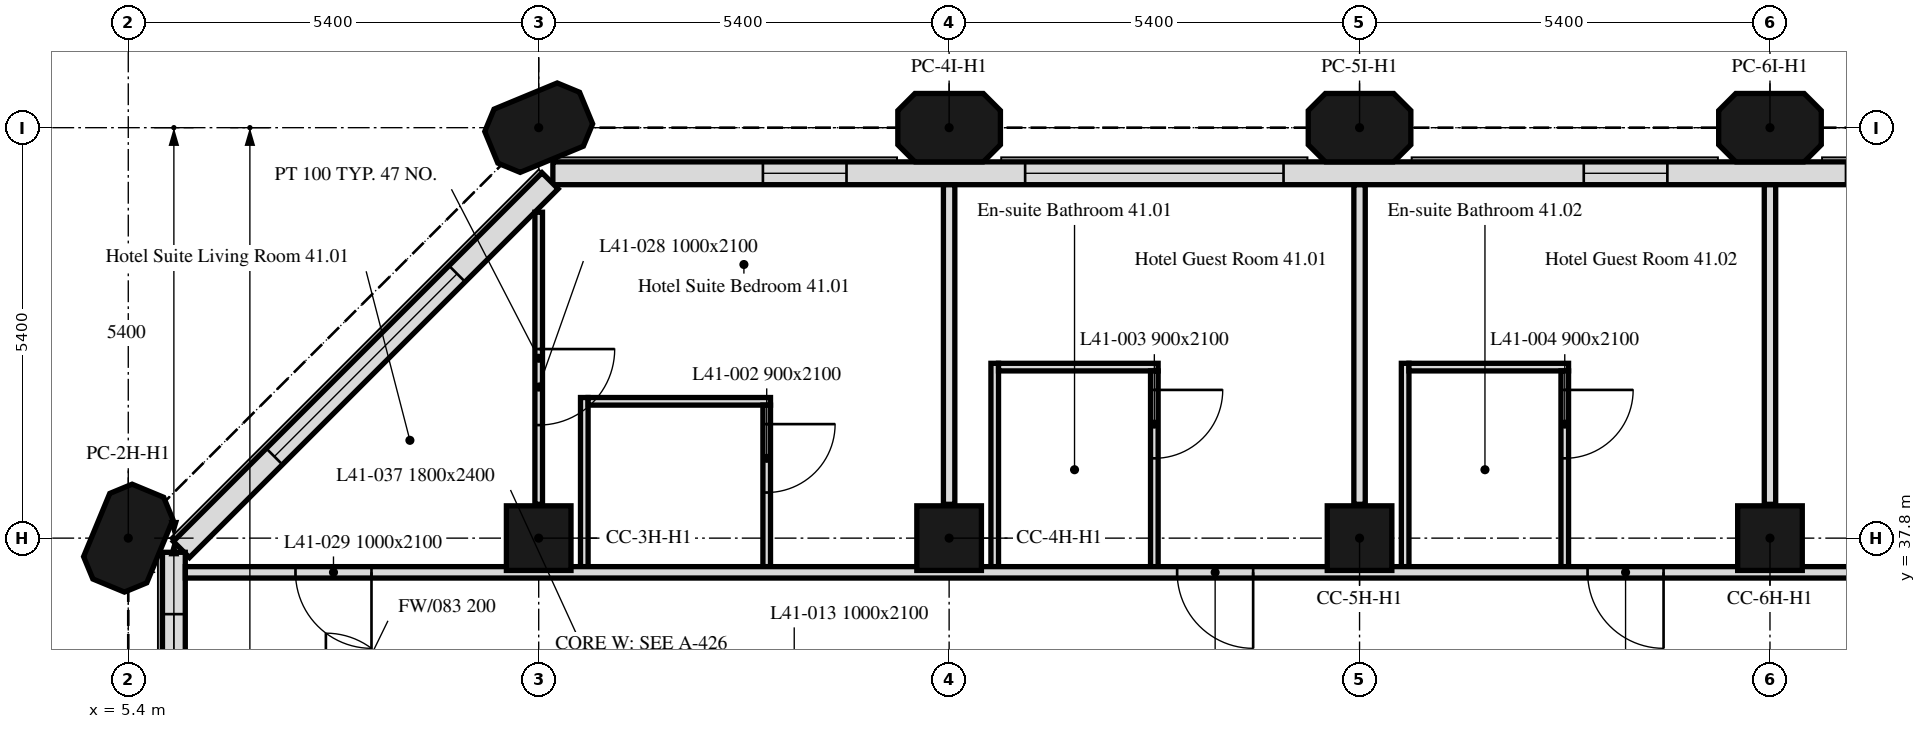
"""IFC4 building model, lengths in metres.
Left out: names, types, materials, properties, quantities, classifications, styles, units other than length and angle.
Written with IfcOpenShell. Run it as: python <this file> out.ifc"""

import sys

from ifc_helpers import new_model, si_unit, direction, frame, frame_2d, origin, origin_2d, place, context, subcontext, project, spatial, polyline, rectangle, outline, extrude, element, fill, save


model = new_model("IFC4")
c1 = context("Model", 3, precision=1e-05, world=origin(), true_north=direction((0.0, 1.0)))
c2 = subcontext(c1, "Body", "Model", "MODEL_VIEW")
j1 = project(units=[si_unit("LENGTHUNIT", "METRE"), si_unit("PLANEANGLEUNIT", "RADIAN")], contexts=[c1])
p1 = place(None, origin())
s1 = spatial("IfcSite", under=j1, at=p1, CompositionType="ELEMENT")
p2 = place(p1, origin())
s2 = spatial("IfcBuilding", under=s1, at=p2, CompositionType="ELEMENT")
p3 = place(p2, frame((0.0, 0.0, 172.6)))
s3 = spatial("IfcBuildingStorey", under=s2, at=p3, CompositionType="ELEMENT", Elevation=172.6)
p4 = place(p3, frame((5.4, 37.8, 0.0), z_axis=(0.0, 0.0, 1.0), x_axis=(0.382683432365, 0.923879532511, 0.0)))
e1 = element("IfcColumn", 1, at=p4, inside=s3, PredefinedType="COLUMN", context=c2, shape_type="SweptSolid", body=[
    extrude(outline(polyline([(-0.45, -0.45), (0.45, -0.45), (0.675, -0.225), (0.675, 0.225), (0.45, 0.45), (-0.45, 0.45), (-0.675, 0.225), (-0.675, -0.225), (-0.45, -0.45)])), origin(), (0.0, 0.0, 1.0), 2.8),
])
for number, where, z_axis, x_axis in (
    (2, (10.8, 37.8, 0.0), (0.0, 0.0, 1.0), (1.0, 0.0, 0.0)),
    (3, (16.2, 37.8, 0.0), (0.0, 0.0, 1.0), (1.0, 0.0, 0.0)),
    (4, (21.6, 37.8, 0.0), (0.0, 0.0, 1.0), (1.0, 0.0, 0.0)),
    (5, (27.0, 37.8, 0.0), (0.0, 0.0, 1.0), (1.0, 0.0, 0.0)),
):
    element("IfcColumn", number, at=place(p3, frame(where, z_axis=z_axis, x_axis=x_axis)), inside=s3, PredefinedType="COLUMN", context=c2, shape_type="SweptSolid", body=[
        extrude(rectangle(XDim=0.85, YDim=0.85, at=origin_2d()), origin(), (0.0, 0.0, 1.0), 2.8),
    ])
for number, where, z_axis, x_axis in (
    (6, (10.8, 43.2, 0.0), (0.0, 0.0, 1.0), (0.924, 0.383, 0.0)),
    (7, (16.2, 43.2, 0.0), (0.0, 0.0, 1.0), (1.0, 0.0, 0.0)),
    (8, (21.6, 43.2, 0.0), (0.0, 0.0, 1.0), (1.0, 0.0, 0.0)),
    (9, (27.0, 43.2, 0.0), (0.0, 0.0, 1.0), (1.0, 0.0, 0.0)),
):
    element("IfcColumn", number, at=place(p3, frame(where, z_axis=z_axis, x_axis=x_axis)), inside=s3, PredefinedType="COLUMN", context=c2, shape_type="SweptSolid", body=[
        extrude(outline(polyline([(-0.45, -0.45), (0.45, -0.45), (0.675, -0.225), (0.675, 0.225), (0.45, 0.45), (-0.45, 0.45), (-0.675, 0.225), (-0.675, -0.225), (-0.45, -0.45)])), origin(), (0.0, 0.0, 1.0), 2.8),
    ])
p5 = place(p3, frame((43.014, 42.6, 0.0), z_axis=(0.0, 0.0, 1.0), x_axis=(-1.0, 0.0, 0.0)))
e10 = element("IfcWall", 10, at=p5, inside=s3, PredefinedType="SOLIDWALL", context=c2, shape_type="SweptSolid", body=[
    extrude(rectangle(XDim=32.027, YDim=0.3, at=frame_2d((16.014, 0.0))), origin(), (0.0, 0.0, 1.0), 2.8),
])
p6 = place(p5, frame((0.814, 0.0, 0.9)))
e11 = element("IfcOpeningElement", 11, at=p6, cuts=e10, PredefinedType="OPENING", context=c2, shape_type="SweptSolid", body=[
    extrude(rectangle(XDim=3.4, YDim=1.7, at=frame_2d((1.7, 0.85))), frame((0.0, 0.16, 0.0), z_axis=(0.0, -1.0, 0.0), x_axis=(1.0, 0.0, 0.0)), (0.0, 0.0, 1.0), 0.32),
])
p7 = place(p5, frame((6.564, 0.0, 0.9)))
e12 = element("IfcOpeningElement", 12, at=p7, cuts=e10, PredefinedType="OPENING", context=c2, shape_type="SweptSolid", body=[
    extrude(rectangle(XDim=1.1, YDim=1.7, at=frame_2d((0.55, 0.85))), frame((0.0, 0.16, 0.0), z_axis=(0.0, -1.0, 0.0), x_axis=(1.0, 0.0, 0.0)), (0.0, 0.0, 1.0), 0.32),
])
p8 = place(p5, frame((11.614, 0.0, 0.9)))
e13 = element("IfcOpeningElement", 13, at=p8, cuts=e10, PredefinedType="OPENING", context=c2, shape_type="SweptSolid", body=[
    extrude(rectangle(XDim=3.4, YDim=1.7, at=frame_2d((1.7, 0.85))), frame((0.0, 0.16, 0.0), z_axis=(0.0, -1.0, 0.0), x_axis=(1.0, 0.0, 0.0)), (0.0, 0.0, 1.0), 0.32),
])
p9 = place(p5, frame((17.364, 0.0, 0.9)))
e14 = element("IfcOpeningElement", 14, at=p9, cuts=e10, PredefinedType="OPENING", context=c2, shape_type="SweptSolid", body=[
    extrude(rectangle(XDim=1.1, YDim=1.7, at=frame_2d((0.55, 0.85))), frame((0.0, 0.16, 0.0), z_axis=(0.0, -1.0, 0.0), x_axis=(1.0, 0.0, 0.0)), (0.0, 0.0, 1.0), 0.32),
])
p10 = place(p5, frame((22.414, 0.0, 0.9)))
e15 = element("IfcOpeningElement", 15, at=p10, cuts=e10, PredefinedType="OPENING", context=c2, shape_type="SweptSolid", body=[
    extrude(rectangle(XDim=3.4, YDim=1.7, at=frame_2d((1.7, 0.85))), frame((0.0, 0.16, 0.0), z_axis=(0.0, -1.0, 0.0), x_axis=(1.0, 0.0, 0.0)), (0.0, 0.0, 1.0), 0.32),
])
p11 = place(p5, frame((28.164, 0.0, 0.9)))
e16 = element("IfcOpeningElement", 16, at=p11, cuts=e10, PredefinedType="OPENING", context=c2, shape_type="SweptSolid", body=[
    extrude(rectangle(XDim=1.1, YDim=1.7, at=frame_2d((0.55, 0.85))), frame((0.0, 0.16, 0.0), z_axis=(0.0, -1.0, 0.0), x_axis=(1.0, 0.0, 0.0)), (0.0, 0.0, 1.0), 0.32),
])
p12 = place(p3, frame((10.949, 42.501, 0.0), z_axis=(0.0, 0.0, 1.0), x_axis=(-0.707106781187, -0.707106781187, 0.0)))
e17 = element("IfcWall", 17, at=p12, inside=s3, PredefinedType="SOLIDWALL", context=c2, shape_type="SweptSolid", body=[
    extrude(rectangle(XDim=6.86, YDim=0.3, at=frame_2d((3.43, 0.0))), origin(), (0.0, 0.0, 1.0), 2.8),
])
p13 = place(p12, frame((1.73, 0.0, 0.9)))
e18 = element("IfcOpeningElement", 18, at=p13, cuts=e17, PredefinedType="OPENING", context=c2, shape_type="SweptSolid", body=[
    extrude(rectangle(XDim=3.4, YDim=1.7, at=frame_2d((1.7, 0.85))), frame((0.0, 0.16, 0.0), z_axis=(0.0, -1.0, 0.0), x_axis=(1.0, 0.0, 0.0)), (0.0, 0.0, 1.0), 0.32),
])
p14 = place(p3, frame((6.0, 37.614, 0.0), z_axis=(0.0, 0.0, 1.0), x_axis=(0.0, -1.0, 0.0)))
e19 = element("IfcWall", 19, at=p14, inside=s3, PredefinedType="SOLIDWALL", context=c2, shape_type="SweptSolid", body=[
    extrude(rectangle(XDim=5.214, YDim=0.3, at=frame_2d((2.607, 0.0))), origin(), (0.0, 0.0, 1.0), 2.8),
])
p15 = place(p14, frame((0.814, 0.0, 0.9)))
e20 = element("IfcOpeningElement", 20, at=p15, cuts=e19, PredefinedType="OPENING", context=c2, shape_type="SweptSolid", body=[
    extrude(rectangle(XDim=1.1, YDim=1.7, at=frame_2d((0.55, 0.85))), frame((0.0, 0.16, 0.0), z_axis=(0.0, -1.0, 0.0), x_axis=(1.0, 0.0, 0.0)), (0.0, 0.0, 1.0), 0.32),
])
p16 = place(p14, frame((2.764, 0.0, 0.9)))
e21 = element("IfcOpeningElement", 21, at=p16, cuts=e19, PredefinedType="OPENING", context=c2, shape_type="SweptSolid", body=[
    extrude(rectangle(XDim=1.1, YDim=1.7, at=frame_2d((0.55, 0.85))), frame((0.0, 0.16, 0.0), z_axis=(0.0, -1.0, 0.0), x_axis=(1.0, 0.0, 0.0)), (0.0, 0.0, 1.0), 0.32),
])
p17 = place(p3, frame((10.8, 42.088, 0.0), z_axis=(0.0, 0.0, 1.0), x_axis=(0.0, -1.0, 0.0)))
e22 = element("IfcWall", 22, at=p17, inside=s3, PredefinedType="PARTITIONING", context=c2, shape_type="SweptSolid", body=[
    extrude(rectangle(XDim=3.843, YDim=0.1, at=frame_2d((1.921, 0.0))), origin(), (0.0, 0.0, 1.0), 2.8),
])
p18 = place(p17, frame((1.8, 0.0, 0.0)))
e23 = element("IfcOpeningElement", 23, at=p18, cuts=e22, PredefinedType="OPENING", context=c2, shape_type="SweptSolid", body=[
    extrude(rectangle(XDim=1.0, YDim=2.1, at=frame_2d((0.5, 1.05))), frame((0.0, 0.05, 0.0), z_axis=(0.0, -1.0, 0.0), x_axis=(1.0, 0.0, 0.0)), (0.0, 0.0, 1.0), 0.1),
])
p19 = place(p3, frame((11.4, 37.425, 0.0), z_axis=(0.0, 0.0, 1.0), x_axis=(0.0, 1.0, 0.0)))
e24 = element("IfcWall", 24, at=p19, inside=s3, PredefinedType="PARTITIONING", context=c2, shape_type="SweptSolid", body=[
    extrude(rectangle(XDim=2.225, YDim=0.1, at=frame_2d((1.112, 0.0))), origin(), (0.0, 0.0, 1.0), 2.8),
])
p20 = place(p3, frame((11.45, 39.6, 0.0), z_axis=(0.0, 0.0, 1.0), x_axis=(1.0, 0.0, 0.0)))
e25 = element("IfcWall", 25, at=p20, inside=s3, PredefinedType="PARTITIONING", context=c2, shape_type="SweptSolid", body=[
    extrude(rectangle(XDim=2.4, YDim=0.1, at=frame_2d((1.2, 0.0))), origin(), (0.0, 0.0, 1.0), 2.8),
])
p21 = place(p3, frame((13.8, 39.55, 0.0), z_axis=(0.0, 0.0, 1.0), x_axis=(0.0, -1.0, 0.0)))
e26 = element("IfcWall", 26, at=p21, inside=s3, PredefinedType="PARTITIONING", context=c2, shape_type="SweptSolid", body=[
    extrude(rectangle(XDim=2.125, YDim=0.1, at=frame_2d((1.062, 0.0))), origin(), (0.0, 0.0, 1.0), 2.8),
])
p22 = place(p21, frame((0.25, 0.0, 0.0)))
e27 = element("IfcOpeningElement", 27, at=p22, cuts=e26, PredefinedType="OPENING", context=c2, shape_type="SweptSolid", body=[
    extrude(rectangle(XDim=0.9, YDim=2.1, at=frame_2d((0.45, 1.05))), frame((0.0, 0.05, 0.0), z_axis=(0.0, -1.0, 0.0), x_axis=(1.0, 0.0, 0.0)), (0.0, 0.0, 1.0), 0.1),
])
p23 = place(p3, frame((16.2, 38.245, 0.0), z_axis=(0.0, 0.0, 1.0), x_axis=(0.0, 1.0, 0.0)))
e28 = element("IfcWall", 28, at=p23, inside=s3, PredefinedType="PARTITIONING", context=c2, shape_type="SweptSolid", body=[
    extrude(rectangle(XDim=4.204, YDim=0.15, at=frame_2d((2.102, 0.0))), origin(), (0.0, 0.0, 1.0), 2.8),
])
p24 = place(p3, frame((16.8, 37.425, 0.0), z_axis=(0.0, 0.0, 1.0), x_axis=(0.0, 1.0, 0.0)))
e29 = element("IfcWall", 29, at=p24, inside=s3, PredefinedType="PARTITIONING", context=c2, shape_type="SweptSolid", body=[
    extrude(rectangle(XDim=2.675, YDim=0.1, at=frame_2d((1.337, 0.0))), origin(), (0.0, 0.0, 1.0), 2.8),
])
p25 = place(p3, frame((16.85, 40.05, 0.0), z_axis=(0.0, 0.0, 1.0), x_axis=(1.0, 0.0, 0.0)))
e30 = element("IfcWall", 30, at=p25, inside=s3, PredefinedType="PARTITIONING", context=c2, shape_type="SweptSolid", body=[
    extrude(rectangle(XDim=2.1, YDim=0.1, at=frame_2d((1.05, 0.0))), origin(), (0.0, 0.0, 1.0), 2.8),
])
p26 = place(p3, frame((18.9, 40.0, 0.0), z_axis=(0.0, 0.0, 1.0), x_axis=(0.0, -1.0, 0.0)))
e31 = element("IfcWall", 31, at=p26, inside=s3, PredefinedType="PARTITIONING", context=c2, shape_type="SweptSolid", body=[
    extrude(rectangle(XDim=2.575, YDim=0.1, at=frame_2d((1.288, 0.0))), origin(), (0.0, 0.0, 1.0), 2.8),
])
p27 = place(p26, frame((0.25, 0.0, 0.0)))
e32 = element("IfcOpeningElement", 32, at=p27, cuts=e31, PredefinedType="OPENING", context=c2, shape_type="SweptSolid", body=[
    extrude(rectangle(XDim=0.9, YDim=2.1, at=frame_2d((0.45, 1.05))), frame((0.0, 0.05, 0.0), z_axis=(0.0, -1.0, 0.0), x_axis=(1.0, 0.0, 0.0)), (0.0, 0.0, 1.0), 0.1),
])
p28 = place(p3, frame((21.6, 38.245, 0.0), z_axis=(0.0, 0.0, 1.0), x_axis=(0.0, 1.0, 0.0)))
e33 = element("IfcWall", 33, at=p28, inside=s3, PredefinedType="PARTITIONING", context=c2, shape_type="SweptSolid", body=[
    extrude(rectangle(XDim=4.204, YDim=0.15, at=frame_2d((2.102, 0.0))), origin(), (0.0, 0.0, 1.0), 2.8),
])
p29 = place(p3, frame((22.2, 37.425, 0.0), z_axis=(0.0, 0.0, 1.0), x_axis=(0.0, 1.0, 0.0)))
e34 = element("IfcWall", 34, at=p29, inside=s3, PredefinedType="PARTITIONING", context=c2, shape_type="SweptSolid", body=[
    extrude(rectangle(XDim=2.675, YDim=0.1, at=frame_2d((1.337, 0.0))), origin(), (0.0, 0.0, 1.0), 2.8),
])
p30 = place(p3, frame((22.25, 40.05, 0.0), z_axis=(0.0, 0.0, 1.0), x_axis=(1.0, 0.0, 0.0)))
e35 = element("IfcWall", 35, at=p30, inside=s3, PredefinedType="PARTITIONING", context=c2, shape_type="SweptSolid", body=[
    extrude(rectangle(XDim=2.1, YDim=0.1, at=frame_2d((1.05, 0.0))), origin(), (0.0, 0.0, 1.0), 2.8),
])
p31 = place(p3, frame((24.3, 40.0, 0.0), z_axis=(0.0, 0.0, 1.0), x_axis=(0.0, -1.0, 0.0)))
e36 = element("IfcWall", 36, at=p31, inside=s3, PredefinedType="PARTITIONING", context=c2, shape_type="SweptSolid", body=[
    extrude(rectangle(XDim=2.575, YDim=0.1, at=frame_2d((1.288, 0.0))), origin(), (0.0, 0.0, 1.0), 2.8),
])
p32 = place(p31, frame((0.25, 0.0, 0.0)))
e37 = element("IfcOpeningElement", 37, at=p32, cuts=e36, PredefinedType="OPENING", context=c2, shape_type="SweptSolid", body=[
    extrude(rectangle(XDim=0.9, YDim=2.1, at=frame_2d((0.45, 1.05))), frame((0.0, 0.05, 0.0), z_axis=(0.0, -1.0, 0.0), x_axis=(1.0, 0.0, 0.0)), (0.0, 0.0, 1.0), 0.1),
])
p33 = place(p3, frame((27.0, 38.245, 0.0), z_axis=(0.0, 0.0, 1.0), x_axis=(0.0, 1.0, 0.0)))
e38 = element("IfcWall", 38, at=p33, inside=s3, PredefinedType="PARTITIONING", context=c2, shape_type="SweptSolid", body=[
    extrude(rectangle(XDim=4.204, YDim=0.15, at=frame_2d((2.102, 0.0))), origin(), (0.0, 0.0, 1.0), 2.8),
])
p34 = place(p3, frame((47.849, 37.35, 0.0), z_axis=(0.0, 0.0, 1.0), x_axis=(-1.0, 0.0, 0.0)))
e39 = element("IfcWall", 39, at=p34, inside=s3, PredefinedType="PARTITIONING", context=c2, shape_type="SweptSolid", body=[
    extrude(rectangle(XDim=41.698, YDim=0.15, at=frame_2d((20.849, 0.0))), origin(), (0.0, 0.0, 1.0), 2.8),
])
p35 = place(p34, frame((39.249, 0.0, 0.0)))
e40 = element("IfcOpeningElement", 40, at=p35, cuts=e39, PredefinedType="OPENING", context=c2, shape_type="SweptSolid", body=[
    extrude(rectangle(XDim=1.0, YDim=2.1, at=frame_2d((0.5, 1.05))), frame((0.0, 0.075, 0.0), z_axis=(0.0, -1.0, 0.0), x_axis=(1.0, 0.0, 0.0)), (0.0, 0.0, 1.0), 0.15),
])
p36 = place(p34, frame((27.649, 0.0, 0.0)))
e41 = element("IfcOpeningElement", 41, at=p36, cuts=e39, PredefinedType="OPENING", context=c2, shape_type="SweptSolid", body=[
    extrude(rectangle(XDim=1.0, YDim=2.1, at=frame_2d((0.5, 1.05))), frame((0.0, 0.075, 0.0), z_axis=(0.0, -1.0, 0.0), x_axis=(1.0, 0.0, 0.0)), (0.0, 0.0, 1.0), 0.15),
])
p37 = place(p34, frame((22.249, 0.0, 0.0)))
e42 = element("IfcOpeningElement", 42, at=p37, cuts=e39, PredefinedType="OPENING", context=c2, shape_type="SweptSolid", body=[
    extrude(rectangle(XDim=1.0, YDim=2.1, at=frame_2d((0.5, 1.05))), frame((0.0, 0.075, 0.0), z_axis=(0.0, -1.0, 0.0), x_axis=(1.0, 0.0, 0.0)), (0.0, 0.0, 1.0), 0.15),
])
p38 = place(p34, frame((17.649, 0.0, 0.0)))
e43 = element("IfcOpeningElement", 43, at=p38, cuts=e39, PredefinedType="OPENING", context=c2, shape_type="SweptSolid", body=[
    extrude(rectangle(XDim=1.0, YDim=2.1, at=frame_2d((0.5, 1.05))), frame((0.0, 0.075, 0.0), z_axis=(0.0, -1.0, 0.0), x_axis=(1.0, 0.0, 0.0)), (0.0, 0.0, 1.0), 0.15),
])
p39 = place(p34, frame((2.744, 0.0, 0.0)))
e44 = element("IfcOpeningElement", 44, at=p39, cuts=e39, PredefinedType="OPENING", context=c2, shape_type="SweptSolid", body=[
    extrude(rectangle(XDim=1.0, YDim=2.1, at=frame_2d((0.5, 1.05))), frame((0.0, 0.075, 0.0), z_axis=(0.0, -1.0, 0.0), x_axis=(1.0, 0.0, 0.0)), (0.0, 0.0, 1.0), 0.15),
])
p40 = place(p9, origin())
e45 = element("IfcWindow", 45, at=p40, inside=s3, PartitioningType="SINGLE_PANEL", PredefinedType="WINDOW", context=c2, shape_type="SweptSolid", body=[
    extrude(rectangle(XDim=1.1, YDim=1.7, at=frame_2d((0.55, 0.85))), frame((0.0, 0.03, 0.0), z_axis=(0.0, -1.0, 0.0), x_axis=(1.0, 0.0, 0.0)), (0.0, 0.0, 1.0), 0.06),
])
fill(e14, e45)
p41 = place(p10, origin())
e46 = element("IfcWindow", 46, at=p41, inside=s3, PartitioningType="SINGLE_PANEL", PredefinedType="WINDOW", context=c2, shape_type="SweptSolid", body=[
    extrude(rectangle(XDim=3.4, YDim=1.7, at=frame_2d((1.7, 0.85))), frame((0.0, 0.03, 0.0), z_axis=(0.0, -1.0, 0.0), x_axis=(1.0, 0.0, 0.0)), (0.0, 0.0, 1.0), 0.06),
])
fill(e15, e46)
p42 = place(p11, origin())
e47 = element("IfcWindow", 47, at=p42, inside=s3, PartitioningType="SINGLE_PANEL", PredefinedType="WINDOW", context=c2, shape_type="SweptSolid", body=[
    extrude(rectangle(XDim=1.1, YDim=1.7, at=frame_2d((0.55, 0.85))), frame((0.0, 0.03, 0.0), z_axis=(0.0, -1.0, 0.0), x_axis=(1.0, 0.0, 0.0)), (0.0, 0.0, 1.0), 0.06),
])
fill(e16, e47)
p43 = place(p13, origin())
e48 = element("IfcWindow", 48, at=p43, inside=s3, PartitioningType="SINGLE_PANEL", PredefinedType="WINDOW", context=c2, shape_type="SweptSolid", body=[
    extrude(rectangle(XDim=3.4, YDim=1.7, at=frame_2d((1.7, 0.85))), frame((0.0, 0.03, 0.0), z_axis=(0.0, -1.0, 0.0), x_axis=(1.0, 0.0, 0.0)), (0.0, 0.0, 1.0), 0.06),
])
fill(e18, e48)
p44 = place(p15, origin())
e49 = element("IfcWindow", 49, at=p44, inside=s3, PartitioningType="SINGLE_PANEL", PredefinedType="WINDOW", context=c2, shape_type="SweptSolid", body=[
    extrude(rectangle(XDim=1.1, YDim=1.7, at=frame_2d((0.55, 0.85))), frame((0.0, 0.03, 0.0), z_axis=(0.0, -1.0, 0.0), x_axis=(1.0, 0.0, 0.0)), (0.0, 0.0, 1.0), 0.06),
])
fill(e20, e49)
p45 = place(p22, origin())
e50 = element("IfcDoor", 50, at=p45, inside=s3, OperationType="SINGLE_SWING_LEFT", PredefinedType="DOOR", context=c2, shape_type="SweptSolid", body=[
    extrude(rectangle(XDim=0.9, YDim=2.1, at=frame_2d((0.45, 1.05))), frame((0.0, 0.025, 0.0), z_axis=(0.0, -1.0, 0.0), x_axis=(1.0, 0.0, 0.0)), (0.0, 0.0, 1.0), 0.05),
])
fill(e27, e50)
p46 = place(p27, origin())
e51 = element("IfcDoor", 51, at=p46, inside=s3, OperationType="SINGLE_SWING_LEFT", PredefinedType="DOOR", context=c2, shape_type="SweptSolid", body=[
    extrude(rectangle(XDim=0.9, YDim=2.1, at=frame_2d((0.45, 1.05))), frame((0.0, 0.025, 0.0), z_axis=(0.0, -1.0, 0.0), x_axis=(1.0, 0.0, 0.0)), (0.0, 0.0, 1.0), 0.05),
])
fill(e32, e51)
p47 = place(p32, origin())
e52 = element("IfcDoor", 52, at=p47, inside=s3, OperationType="SINGLE_SWING_RIGHT", PredefinedType="DOOR", context=c2, shape_type="SweptSolid", body=[
    extrude(rectangle(XDim=0.9, YDim=2.1, at=frame_2d((0.45, 1.05))), frame((0.0, 0.025, 0.0), z_axis=(0.0, -1.0, 0.0), x_axis=(1.0, 0.0, 0.0)), (0.0, 0.0, 1.0), 0.05),
])
fill(e37, e52)
p48 = place(p18, origin())
e53 = element("IfcDoor", 53, at=p48, inside=s3, OperationType="SINGLE_SWING_LEFT", PredefinedType="DOOR", context=c2, shape_type="SweptSolid", body=[
    extrude(rectangle(XDim=1.0, YDim=2.1, at=frame_2d((0.5, 1.05))), frame((0.0, 0.025, 0.0), z_axis=(0.0, -1.0, 0.0), x_axis=(1.0, 0.0, 0.0)), (0.0, 0.0, 1.0), 0.05),
])
fill(e23, e53)
p49 = place(p35, origin())
e54 = element("IfcDoor", 54, at=p49, inside=s3, OperationType="SINGLE_SWING_RIGHT", PredefinedType="DOOR", context=c2, shape_type="SweptSolid", body=[
    extrude(rectangle(XDim=1.0, YDim=2.1, at=frame_2d((0.5, 1.05))), frame((0.0, 0.025, 0.0), z_axis=(0.0, -1.0, 0.0), x_axis=(1.0, 0.0, 0.0)), (0.0, 0.0, 1.0), 0.05),
])
fill(e40, e54)
p50 = place(p36, origin())
e55 = element("IfcDoor", 55, at=p50, inside=s3, OperationType="SINGLE_SWING_RIGHT", PredefinedType="DOOR", context=c2, shape_type="SweptSolid", body=[
    extrude(rectangle(XDim=1.0, YDim=2.1, at=frame_2d((0.5, 1.05))), frame((0.0, 0.025, 0.0), z_axis=(0.0, -1.0, 0.0), x_axis=(1.0, 0.0, 0.0)), (0.0, 0.0, 1.0), 0.05),
])
fill(e41, e55)
p51 = place(p37, origin())
e56 = element("IfcDoor", 56, at=p51, inside=s3, OperationType="SINGLE_SWING_RIGHT", PredefinedType="DOOR", context=c2, shape_type="SweptSolid", body=[
    extrude(rectangle(XDim=1.0, YDim=2.1, at=frame_2d((0.5, 1.05))), frame((0.0, 0.025, 0.0), z_axis=(0.0, -1.0, 0.0), x_axis=(1.0, 0.0, 0.0)), (0.0, 0.0, 1.0), 0.05),
])
fill(e42, e56)
save(model, sys.argv[1])
